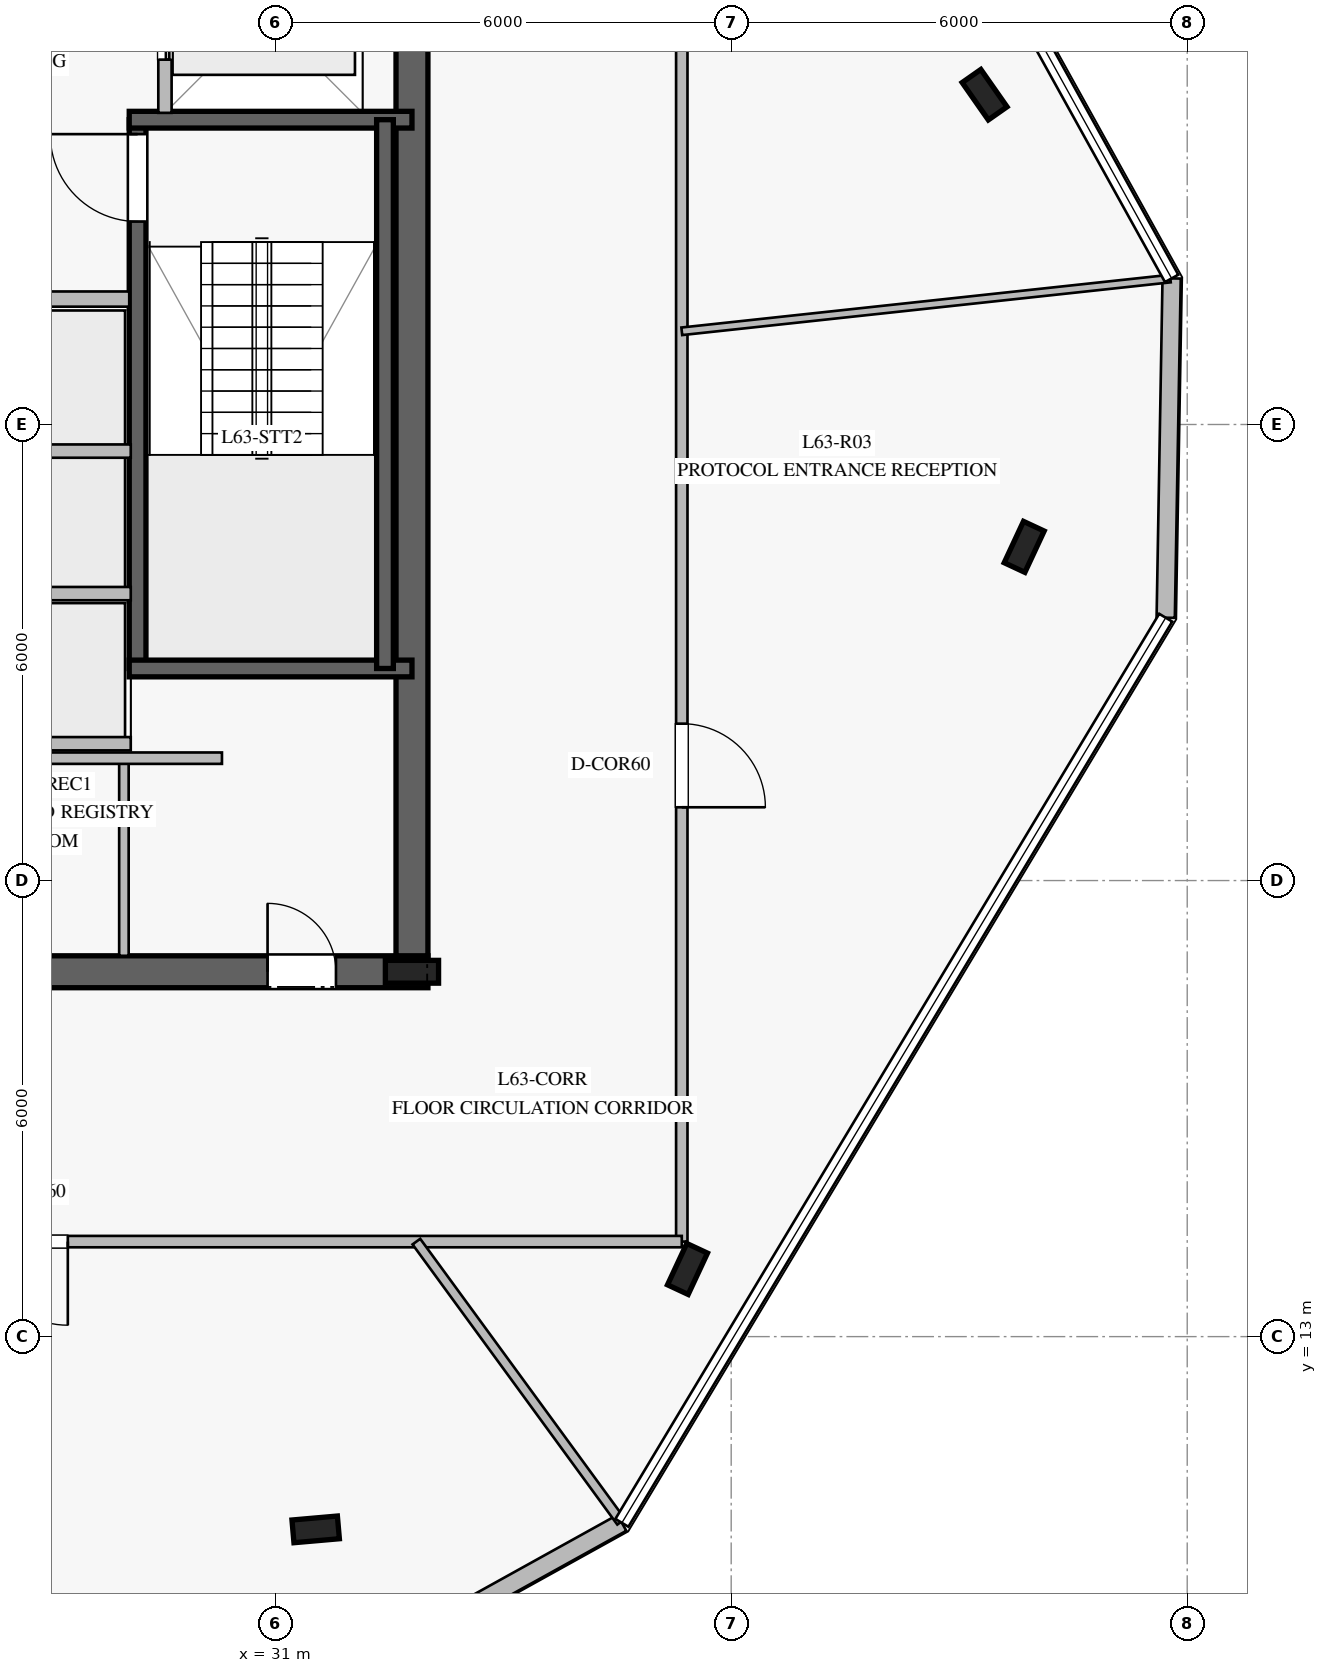
"""IFC4 building model, lengths in metres.
Left out: names, types, materials, properties, quantities, classifications, styles, units other than length and angle.
Written with IfcOpenShell. Run it as: python <this file> out.ifc"""

import sys

from ifc_helpers import new_model, si_unit, direction, frame, frame_2d, origin, origin_2d, place, context, subcontext, project, spatial, rectangle, i_section, extrude, element, fill, save


model = new_model("IFC4")
c1 = context("Model", 3, precision=1e-05, world=origin(), true_north=direction((0.0, 1.0)))
c2 = subcontext(c1, "Body", "Model", "MODEL_VIEW")
j1 = project(units=[si_unit("LENGTHUNIT", "METRE"), si_unit("PLANEANGLEUNIT", "RADIAN")], contexts=[c1])
p1 = place(None, origin())
s1 = spatial("IfcSite", under=j1, at=p1, CompositionType="ELEMENT")
p2 = place(p1, origin())
s2 = spatial("IfcBuilding", under=s1, at=p2, CompositionType="ELEMENT")
p3 = place(p2, frame((0.0, 0.0, 262.2)))
s3 = spatial("IfcBuildingStorey", under=s2, at=p3, CompositionType="ELEMENT", Elevation=262.2)
p4 = place(p3, frame((16.99, 17.8, 0.0), z_axis=(0.0, 0.0, 1.0), x_axis=(1.0, 0.0, 0.0)))
e1 = element("IfcWall", 1, at=p4, inside=s3, PredefinedType="SHEAR", context=c2, shape_type="SweptSolid", body=[
    extrude(rectangle(XDim=16.02, YDim=0.42, at=frame_2d((8.01, 0.0))), origin(), (0.0, 0.0, 1.0), 3.78),
])
p5 = place(p4, frame((4.96, 0.0, 0.0)))
e2 = element("IfcOpeningElement", 2, at=p5, cuts=e1, PredefinedType="OPENING", context=c2, shape_type="SweptSolid", body=[
    extrude(rectangle(XDim=1.2, YDim=2.25, at=frame_2d((0.6, 1.125))), frame((0.0, 0.22, 0.0), z_axis=(0.0, -1.0, 0.0), x_axis=(1.0, 0.0, 0.0)), (0.0, 0.0, 1.0), 0.44),
])
p6 = place(p4, frame((13.91, 0.0, 0.0)))
e3 = element("IfcOpeningElement", 3, at=p6, cuts=e1, PredefinedType="OPENING", context=c2, shape_type="SweptSolid", body=[
    extrude(rectangle(XDim=0.9, YDim=2.1, at=frame_2d((0.45, 1.05))), frame((0.0, 0.22, 0.0), z_axis=(0.0, -1.0, 0.0), x_axis=(1.0, 0.0, 0.0)), (0.0, 0.0, 1.0), 0.44),
])
p7 = place(p4, frame((9.16, 0.0, 0.0)))
e4 = element("IfcOpeningElement", 4, at=p7, cuts=e1, PredefinedType="OPENING", context=c2, shape_type="SweptSolid", body=[
    extrude(rectangle(XDim=1.1, YDim=2.2, at=frame_2d((0.55, 1.1))), frame((0.0, 0.22, 0.0), z_axis=(0.0, -1.0, 0.0), x_axis=(1.0, 0.0, 0.0)), (0.0, 0.0, 1.0), 0.44),
])
p8 = place(p3, frame((32.8, 18.01, 0.0), z_axis=(0.0, 0.0, 1.0), x_axis=(0.0, 1.0, 0.0)))
e5 = element("IfcWall", 5, at=p8, inside=s3, PredefinedType="SHEAR", context=c2, shape_type="SweptSolid", body=[
    extrude(rectangle(XDim=13.98, YDim=0.42, at=frame_2d((6.99, 0.0))), origin(), (0.0, 0.0, 1.0), 3.78),
])
p9 = place(p3, frame((32.8, 17.8, 0.0), z_axis=(0.0, 0.0, 1.0), x_axis=(1.0, 0.0, 0.0)))
e6 = element("IfcColumn", 6, at=p9, inside=s3, PredefinedType="COLUMN", context=c2, shape_type="SweptSolid", body=[
    extrude(i_section(OverallWidth=0.3, OverallDepth=0.7, WebThickness=0.017, FlangeThickness=0.032, at=origin_2d()), origin(), (0.0, 0.0, 1.0), 4.0),
])
p10 = place(p3, frame((29.19, 21.79, 0.0), z_axis=(0.0, 0.0, 1.0), x_axis=(0.0, 1.0, 0.0)))
e7 = element("IfcWall", 7, at=p10, inside=s3, PredefinedType="SOLIDWALL", context=c2, shape_type="SweptSolid", body=[
    extrude(rectangle(XDim=7.22, YDim=0.22, at=frame_2d((3.61, 0.0))), origin(), (0.0, 0.0, 1.0), 3.78),
])
p11 = place(p10, frame((5.88, 0.0, 0.0)))
e8 = element("IfcOpeningElement", 8, at=p11, cuts=e7, PredefinedType="OPENING", context=c2, shape_type="SweptSolid", body=[
    extrude(rectangle(XDim=1.15, YDim=2.2, at=frame_2d((0.575, 1.1))), frame((0.0, 0.12, 0.0), z_axis=(0.0, -1.0, 0.0), x_axis=(1.0, 0.0, 0.0)), (0.0, 0.0, 1.0), 0.24),
])
for number, where, z_axis, x_axis in (
    (9, (29.08, 21.79, 0.0), (0.0, 0.0, 1.0), (1.0, 0.0, 0.0)),
    (10, (29.08, 29.01, 0.0), (0.0, 0.0, 1.0), (1.0, 0.0, 0.0)),
):
    element("IfcWall", number, at=place(p3, frame(where, z_axis=z_axis, x_axis=x_axis)), inside=s3, PredefinedType="SOLIDWALL", context=c2, shape_type="SweptSolid", body=[
        extrude(rectangle(XDim=3.72, YDim=0.22, at=frame_2d((1.86, 0.0))), origin(), (0.0, 0.0, 1.0), 3.78),
    ])
p12 = place(p3, frame((32.445, 29.01, 0.0), z_axis=(0.0, 0.0, 1.0), x_axis=(0.0, -1.0, 0.0)))
e11 = element("IfcWall", 11, at=p12, inside=s3, PredefinedType="SOLIDWALL", context=c2, shape_type="SweptSolid", body=[
    extrude(rectangle(XDim=7.22, YDim=0.22, at=frame_2d((3.61, 0.0))), origin(), (0.0, 0.0, 1.0), 3.78),
])
for number, where, z_axis, x_axis in (
    (12, (31.533, 10.464, 0.0), (0.0, 0.0, 1.0), (0.996, 0.087, 0.0)),
    (13, (36.425, 13.89, 0.0), (0.0, 0.0, 1.0), (0.423, 0.906, 0.0)),
    (14, (40.855, 23.39, 0.0), (0.0, 0.0, 1.0), (0.423, 0.906, 0.0)),
    (15, (40.334, 29.339, 0.0), (0.0, 0.0, 1.0), (-0.574, 0.819, 0.0)),
):
    element("IfcColumn", number, at=place(p3, frame(where, z_axis=z_axis, x_axis=x_axis)), inside=s3, PredefinedType="COLUMN", context=c2, shape_type="SweptSolid", body=[
        extrude(i_section(OverallWidth=0.3, OverallDepth=0.6, WebThickness=0.015, FlangeThickness=0.03, at=origin_2d()), origin(), (0.0, 0.0, 1.0), 4.0),
    ])
p13 = place(p3, frame((31.657, 8.385, 0.0), z_axis=(0.0, 0.0, 1.0), x_axis=(0.874577351509, 0.484886023956, 0.0)))
e16 = element("IfcWall", 16, at=p13, inside=s3, PredefinedType="STANDARD", context=c2, shape_type="SweptSolid", body=[
    extrude(rectangle(XDim=4.465, YDim=0.24, at=frame_2d((2.232, 0.0))), origin(), (0.0, 0.0, 1.0), 3.78),
])
p14 = place(p3, frame((42.717, 22.458, 0.0), z_axis=(0.0, 0.0, 1.0), x_axis=(0.017443339635, 0.999847853377, 0.0)))
e17 = element("IfcWall", 17, at=p14, inside=s3, PredefinedType="STANDARD", context=c2, shape_type="SweptSolid", body=[
    extrude(rectangle(XDim=4.465, YDim=0.24, at=frame_2d((2.232, 0.0))), origin(), (0.0, 0.0, 1.0), 3.78),
])
p15 = place(p3, frame((25.7, 26.65, 0.0), z_axis=(0.0, 0.0, 1.0), x_axis=(1.0, 0.0, 0.0)))
e18 = element("IfcWall", 18, at=p15, inside=s3, PredefinedType="PARTITIONING", context=c2, shape_type="SweptSolid", body=[
    extrude(rectangle(XDim=3.38, YDim=0.2, at=frame_2d((1.69, 0.0))), origin(), (0.0, 0.0, 1.0), 3.78),
])
p16 = place(p3, frame((29.01, 18.01, 0.0), z_axis=(0.0, 0.0, 1.0), x_axis=(0.0, 1.0, 0.0)))
e19 = element("IfcWall", 19, at=p16, inside=s3, PredefinedType="PARTITIONING", context=c2, shape_type="SweptSolid", body=[
    extrude(rectangle(XDim=2.54, YDim=0.125, at=frame_2d((1.27, 0.0))), origin(), (0.0, 0.0, 1.0), 3.08),
])
p17 = place(p3, frame((24.4, 20.61, 0.0), z_axis=(0.0, 0.0, 1.0), x_axis=(1.0, 0.0, 0.0)))
e20 = element("IfcWall", 20, at=p17, inside=s3, PredefinedType="PARTITIONING", context=c2, shape_type="SweptSolid", body=[
    extrude(rectangle(XDim=5.9, YDim=0.15, at=frame_2d((2.95, 0.0))), origin(), (0.0, 0.0, 1.0), 3.78),
])
for number, where, z_axis, x_axis in (
    (21, (26.75, 20.8, 0.0), (0.0, 0.0, 1.0), (1.0, 0.0, 0.0)),
    (22, (26.75, 22.775, 0.0), (0.0, 0.0, 1.0), (1.0, 0.0, 0.0)),
    (23, (26.75, 24.65, 0.0), (0.0, 0.0, 1.0), (1.0, 0.0, 0.0)),
):
    element("IfcWall", number, at=place(p3, frame(where, z_axis=z_axis, x_axis=x_axis)), inside=s3, PredefinedType="PARTITIONING", context=c2, shape_type="SweptSolid", body=[
        extrude(rectangle(XDim=2.35, YDim=0.175, at=frame_2d((1.175, 0.0))), origin(), (0.0, 0.0, 1.0), 3.78),
    ])
p18 = place(p3, frame((29.55, 29.1, 0.0), z_axis=(0.0, 0.0, 1.0), x_axis=(0.0, 1.0, 0.0)))
e24 = element("IfcWall", 24, at=p18, inside=s3, PredefinedType="PARTITIONING", context=c2, shape_type="SweptSolid", body=[
    extrude(rectangle(XDim=2.6, YDim=0.175, at=frame_2d((1.3, 0.0))), origin(), (0.0, 0.0, 1.0), 3.78),
])
p19 = place(p18, frame((0.7, 0.0, 0.0)))
e25 = element("IfcOpeningElement", 25, at=p19, cuts=e24, PredefinedType="OPENING", context=c2, shape_type="SweptSolid", body=[
    extrude(rectangle(XDim=1.2, YDim=2.2, at=frame_2d((0.6, 1.1))), frame((0.0, 0.098, 0.0), z_axis=(0.0, -1.0, 0.0), x_axis=(1.0, 0.0, 0.0)), (0.0, 0.0, 1.0), 0.195),
])
p20 = place(p3, frame((36.35, 35.75, 0.0), z_axis=(0.0, 0.0, 1.0), x_axis=(0.0, -1.0, 0.0)))
e26 = element("IfcWall", 26, at=p20, inside=s3, PredefinedType="PARTITIONING", context=c2, shape_type="SweptSolid", body=[
    extrude(rectangle(XDim=21.5, YDim=0.15, at=frame_2d((10.75, 0.0))), origin(), (0.0, 0.0, 1.0), 3.02),
])
p21 = place(p20, frame((14.686, 0.0, 0.0)))
e27 = element("IfcOpeningElement", 27, at=p21, cuts=e26, PredefinedType="OPENING", context=c2, shape_type="SweptSolid", body=[
    extrude(rectangle(XDim=1.1, YDim=2.2, at=frame_2d((0.55, 1.1))), frame((0.0, 0.085, 0.0), z_axis=(0.0, -1.0, 0.0), x_axis=(1.0, 0.0, 0.0)), (0.0, 0.0, 1.0), 0.17),
])
p22 = place(p3, frame((36.35, 14.25, 0.0), z_axis=(0.0, 0.0, 1.0), x_axis=(-1.0, 0.0, 0.0)))
e28 = element("IfcWall", 28, at=p22, inside=s3, PredefinedType="PARTITIONING", context=c2, shape_type="SweptSolid", body=[
    extrude(rectangle(XDim=22.7, YDim=0.15, at=frame_2d((11.35, 0.0))), origin(), (0.0, 0.0, 1.0), 3.28),
])
p23 = place(p22, frame((17.53, 0.0, 0.0)))
e29 = element("IfcOpeningElement", 29, at=p23, cuts=e28, PredefinedType="OPENING", context=c2, shape_type="SweptSolid", body=[
    extrude(rectangle(XDim=1.1, YDim=2.2, at=frame_2d((0.55, 1.1))), frame((0.0, 0.085, 0.0), z_axis=(0.0, -1.0, 0.0), x_axis=(1.0, 0.0, 0.0)), (0.0, 0.0, 1.0), 0.17),
])
p24 = place(p22, frame((8.078, 0.0, 0.0)))
e30 = element("IfcOpeningElement", 30, at=p24, cuts=e28, PredefinedType="OPENING", context=c2, shape_type="SweptSolid", body=[
    extrude(rectangle(XDim=1.1, YDim=2.2, at=frame_2d((0.55, 1.1))), frame((0.0, 0.085, 0.0), z_axis=(0.0, -1.0, 0.0), x_axis=(1.0, 0.0, 0.0)), (0.0, 0.0, 1.0), 0.17),
])
p25 = place(p3, frame((32.858, 14.25, 0.0), z_axis=(0.0, 0.0, 1.0), x_axis=(0.590080941399, -0.807344091821, 0.0)))
e31 = element("IfcWall", 31, at=p25, inside=s3, PredefinedType="PARTITIONING", context=c2, shape_type="SweptSolid", body=[
    extrude(rectangle(XDim=4.566, YDim=0.125, at=frame_2d((2.283, 0.0))), origin(), (0.0, 0.0, 1.0), 3.28),
])
p26 = place(p3, frame((36.35, 26.226, 0.0), z_axis=(0.0, 0.0, 1.0), x_axis=(0.994224701647, 0.107318417034, 0.0)))
e32 = element("IfcWall", 32, at=p26, inside=s3, PredefinedType="MOVABLE", context=c2, shape_type="SweptSolid", body=[
    extrude(rectangle(XDim=6.465, YDim=0.1, at=frame_2d((3.233, 0.0))), origin(), (0.0, 0.0, 1.0), 3.28),
])
p27 = place(p11, origin())
e33 = element("IfcDoor", 33, at=p27, inside=s3, OperationType="SINGLE_SWING_RIGHT", PredefinedType="DOOR", context=c2, shape_type="SweptSolid", body=[
    extrude(rectangle(XDim=1.15, YDim=2.2, at=frame_2d((0.575, 1.1))), frame((0.0, 0.025, 0.0), z_axis=(0.0, -1.0, 0.0), x_axis=(1.0, 0.0, 0.0)), (0.0, 0.0, 1.0), 0.05),
])
fill(e8, e33)
p28 = place(p6, origin())
e34 = element("IfcDoor", 34, at=p28, inside=s3, OperationType="SINGLE_SWING_LEFT", PredefinedType="DOOR", context=c2, shape_type="SweptSolid", body=[
    extrude(rectangle(XDim=0.9, YDim=2.1, at=frame_2d((0.45, 1.05))), frame((0.0, 0.025, 0.0), z_axis=(0.0, -1.0, 0.0), x_axis=(1.0, 0.0, 0.0)), (0.0, 0.0, 1.0), 0.05),
])
fill(e3, e34)
p29 = place(p19, origin())
e35 = element("IfcDoor", 35, at=p29, inside=s3, OperationType="DOUBLE_DOOR_SLIDING", PredefinedType="DOOR", context=c2, shape_type="SweptSolid", body=[
    extrude(rectangle(XDim=1.2, YDim=2.2, at=frame_2d((0.6, 1.1))), frame((0.0, 0.025, 0.0), z_axis=(0.0, -1.0, 0.0), x_axis=(1.0, 0.0, 0.0)), (0.0, 0.0, 1.0), 0.05),
])
fill(e25, e35)
p30 = place(p24, origin())
e36 = element("IfcDoor", 36, at=p30, inside=s3, OperationType="SINGLE_SWING_LEFT", PredefinedType="DOOR", context=c2, shape_type="SweptSolid", body=[
    extrude(rectangle(XDim=1.1, YDim=2.2, at=frame_2d((0.55, 1.1))), frame((0.0, 0.025, 0.0), z_axis=(0.0, -1.0, 0.0), x_axis=(1.0, 0.0, 0.0)), (0.0, 0.0, 1.0), 0.05),
])
fill(e30, e36)
p31 = place(p21, origin())
e37 = element("IfcDoor", 37, at=p31, inside=s3, OperationType="SINGLE_SWING_RIGHT", PredefinedType="DOOR", context=c2, shape_type="SweptSolid", body=[
    extrude(rectangle(XDim=1.1, YDim=2.2, at=frame_2d((0.55, 1.1))), frame((0.0, 0.025, 0.0), z_axis=(0.0, -1.0, 0.0), x_axis=(1.0, 0.0, 0.0)), (0.0, 0.0, 1.0), 0.05),
])
fill(e27, e37)
save(model, sys.argv[1])
